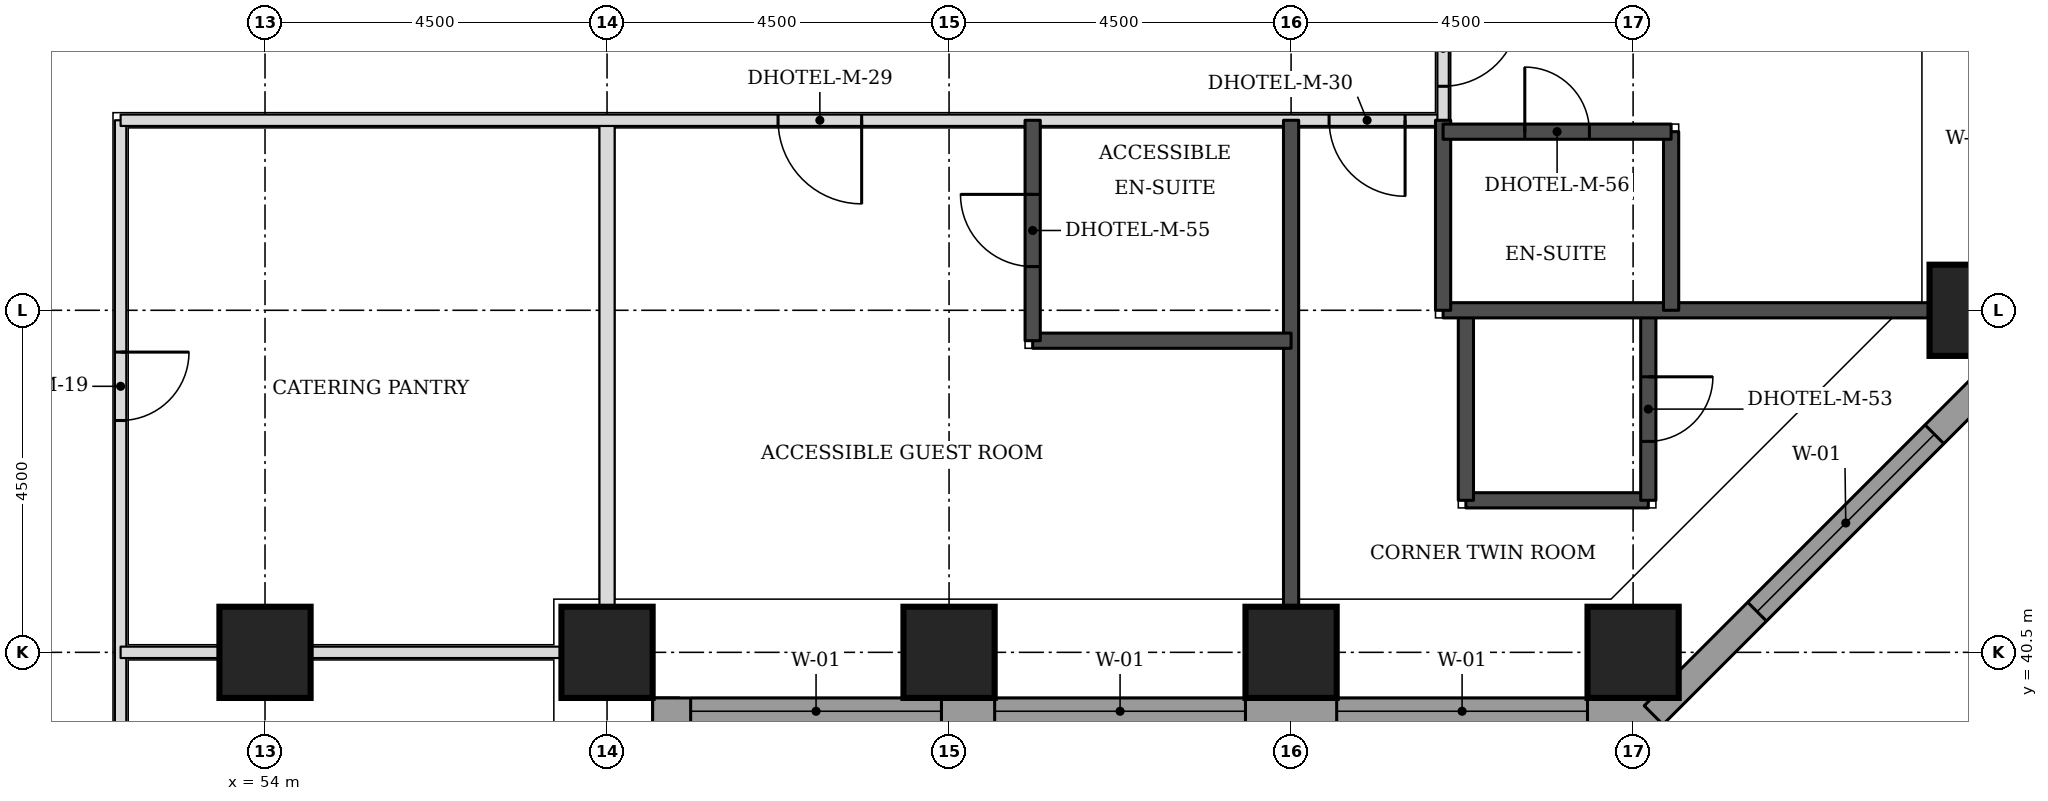
"""IFC4 building model, lengths in metres.
Left out: names, types, materials, properties, quantities, classifications, styles, units other than length and angle.
Written with IfcOpenShell. Run it as: python <this file> out.ifc"""

import sys

from ifc_helpers import new_model, si_unit, direction, frame, frame_2d, origin, origin_2d, place, context, subcontext, project, spatial, rectangle, extrude, element, fill, save


model = new_model("IFC4")
c1 = context("Model", 3, precision=1e-05, world=origin(), true_north=direction((0.0, 1.0)))
c2 = subcontext(c1, "Body", "Model", "MODEL_VIEW")
j1 = project(units=[si_unit("LENGTHUNIT", "METRE"), si_unit("PLANEANGLEUNIT", "RADIAN")], contexts=[c1])
p1 = place(None, origin())
s1 = spatial("IfcSite", under=j1, at=p1, CompositionType="ELEMENT")
p2 = place(p1, origin())
s2 = spatial("IfcBuilding", under=s1, at=p2, CompositionType="ELEMENT")
p3 = place(p2, frame((0.0, 0.0, 23.1)))
s3 = spatial("IfcBuildingStorey", under=s2, at=p3, CompositionType="ELEMENT", Elevation=23.1)
for number, where, z_axis, x_axis in (
    (1, (54.0, 40.5, 0.0), (0.0, 0.0, 1.0), (1.0, 0.0, 0.0)),
    (2, (58.5, 40.5, 0.0), (0.0, 0.0, 1.0), (1.0, 0.0, 0.0)),
    (3, (63.0, 40.5, 0.0), (0.0, 0.0, 1.0), (1.0, 0.0, 0.0)),
    (4, (67.5, 40.5, 0.0), (0.0, 0.0, 1.0), (1.0, 0.0, 0.0)),
    (5, (72.0, 40.5, 0.0), (0.0, 0.0, 1.0), (1.0, 0.0, 0.0)),
    (6, (76.5, 45.0, 0.0), (0.0, 0.0, 1.0), (1.0, 0.0, 0.0)),
):
    element("IfcColumn", number, at=place(p3, frame(where, z_axis=z_axis, x_axis=x_axis)), inside=s3, PredefinedType="COLUMN", context=c2, shape_type="SweptSolid", body=[
        extrude(rectangle(XDim=1.2, YDim=1.2, at=origin_2d()), origin(), (0.0, 0.0, 1.0), 3.3),
    ])
p4 = place(p3, frame((59.275, 22.106, 0.0), z_axis=(0.0, 0.0, 1.0), x_axis=(0.0, 1.0, 0.0)))
e7 = element("IfcWall", 7, at=p4, inside=s3, PredefinedType="STANDARD", context=c2, shape_type="SweptSolid", body=[
    extrude(rectangle(XDim=17.793, YDim=0.35, at=frame_2d((8.897, 0.0))), origin(), (0.0, 0.0, 1.0), 3.055),
])
p5 = place(p4, frame((0.993, 0.0, 0.8)))
e8 = element("IfcOpeningElement", 8, at=p5, cuts=e7, PredefinedType="OPENING", context=c2, shape_type="SweptSolid", body=[
    extrude(rectangle(XDim=3.3, YDim=1.5, at=frame_2d((1.65, 0.75))), frame((0.0, 0.185, 0.0), z_axis=(0.0, -1.0, 0.0), x_axis=(1.0, 0.0, 0.0)), (0.0, 0.0, 1.0), 0.37),
])
p6 = place(p4, frame((5.493, 0.0, 0.8)))
e9 = element("IfcOpeningElement", 9, at=p6, cuts=e7, PredefinedType="OPENING", context=c2, shape_type="SweptSolid", body=[
    extrude(rectangle(XDim=3.3, YDim=1.5, at=frame_2d((1.65, 0.75))), frame((0.0, 0.185, 0.0), z_axis=(0.0, -1.0, 0.0), x_axis=(1.0, 0.0, 0.0)), (0.0, 0.0, 1.0), 0.37),
])
p7 = place(p4, frame((9.993, 0.0, 0.8)))
e10 = element("IfcOpeningElement", 10, at=p7, cuts=e7, PredefinedType="OPENING", context=c2, shape_type="SweptSolid", body=[
    extrude(rectangle(XDim=3.3, YDim=1.5, at=frame_2d((1.65, 0.75))), frame((0.0, 0.185, 0.0), z_axis=(0.0, -1.0, 0.0), x_axis=(1.0, 0.0, 0.0)), (0.0, 0.0, 1.0), 0.37),
])
p8 = place(p4, frame((13.993, 0.0, 0.8)))
e11 = element("IfcOpeningElement", 11, at=p8, cuts=e7, PredefinedType="OPENING", context=c2, shape_type="SweptSolid", body=[
    extrude(rectangle(XDim=3.3, YDim=1.5, at=frame_2d((1.65, 0.75))), frame((0.0, 0.185, 0.0), z_axis=(0.0, -1.0, 0.0), x_axis=(1.0, 0.0, 0.0)), (0.0, 0.0, 1.0), 0.37),
])
p9 = place(p3, frame((59.1, 39.725, 0.0), z_axis=(0.0, 0.0, 1.0), x_axis=(1.0, 0.0, 0.0)))
e12 = element("IfcWall", 12, at=p9, inside=s3, PredefinedType="STANDARD", context=c2, shape_type="SweptSolid", body=[
    extrude(rectangle(XDim=13.293, YDim=0.35, at=frame_2d((6.647, 0.0))), origin(), (0.0, 0.0, 1.0), 3.055),
])
p10 = place(p9, frame((0.5, 0.0, 0.8)))
e13 = element("IfcOpeningElement", 13, at=p10, cuts=e12, PredefinedType="OPENING", context=c2, shape_type="SweptSolid", body=[
    extrude(rectangle(XDim=3.3, YDim=1.5, at=frame_2d((1.65, 0.75))), frame((0.0, 0.185, 0.0), z_axis=(0.0, -1.0, 0.0), x_axis=(1.0, 0.0, 0.0)), (0.0, 0.0, 1.0), 0.37),
])
p11 = place(p9, frame((4.5, 0.0, 0.8)))
e14 = element("IfcOpeningElement", 14, at=p11, cuts=e12, PredefinedType="OPENING", context=c2, shape_type="SweptSolid", body=[
    extrude(rectangle(XDim=3.3, YDim=1.5, at=frame_2d((1.65, 0.75))), frame((0.0, 0.185, 0.0), z_axis=(0.0, -1.0, 0.0), x_axis=(1.0, 0.0, 0.0)), (0.0, 0.0, 1.0), 0.37),
])
p12 = place(p9, frame((9.0, 0.0, 0.8)))
e15 = element("IfcOpeningElement", 15, at=p12, cuts=e12, PredefinedType="OPENING", context=c2, shape_type="SweptSolid", body=[
    extrude(rectangle(XDim=3.3, YDim=1.5, at=frame_2d((1.65, 0.75))), frame((0.0, 0.185, 0.0), z_axis=(0.0, -1.0, 0.0), x_axis=(1.0, 0.0, 0.0)), (0.0, 0.0, 1.0), 0.37),
])
p13 = place(p3, frame((72.27, 39.674, 0.0), z_axis=(0.0, 0.0, 1.0), x_axis=(0.707106781187, 0.707106781187, 0.0)))
e16 = element("IfcWall", 16, at=p13, inside=s3, PredefinedType="STANDARD", context=c2, shape_type="SweptSolid", body=[
    extrude(rectangle(XDim=7.151, YDim=0.35, at=frame_2d((3.576, 0.0))), origin(), (0.0, 0.0, 1.0), 3.055),
])
p14 = place(p13, frame((1.926, 0.0, 0.8)))
e17 = element("IfcOpeningElement", 17, at=p14, cuts=e16, PredefinedType="OPENING", context=c2, shape_type="SweptSolid", body=[
    extrude(rectangle(XDim=3.3, YDim=1.5, at=frame_2d((1.65, 0.75))), frame((0.0, 0.185, 0.0), z_axis=(0.0, -1.0, 0.0), x_axis=(1.0, 0.0, 0.0)), (0.0, 0.0, 1.0), 0.37),
])
p15 = place(p3, frame((58.5, 41.1, 0.0), z_axis=(0.0, 0.0, 1.0), x_axis=(0.0, 1.0, 0.0)))
e18 = element("IfcWall", 18, at=p15, inside=s3, PredefinedType="PARTITIONING", context=c2, shape_type="SweptSolid", body=[
    extrude(rectangle(XDim=6.4, YDim=0.2, at=frame_2d((3.2, 0.0))), origin(), (0.0, 0.0, 1.0), 3.08),
])
p16 = place(p3, frame((52.1, 24.4, 0.0), z_axis=(0.0, 0.0, 1.0), x_axis=(0.0, 1.0, 0.0)))
e19 = element("IfcWall", 19, at=p16, inside=s3, PredefinedType="PARTITIONING", context=c2, shape_type="SweptSolid", body=[
    extrude(rectangle(XDim=23.1, YDim=0.15, at=frame_2d((11.55, 0.0))), origin(), (0.0, 0.0, 1.0), 3.08),
])
p17 = place(p16, frame((0.447, 0.0, 0.0)))
e20 = element("IfcOpeningElement", 20, at=p17, cuts=e19, PredefinedType="OPENING", context=c2, shape_type="SweptSolid", body=[
    extrude(rectangle(XDim=0.9, YDim=2.1, at=frame_2d((0.45, 1.05))), frame((0.0, 0.085, 0.0), z_axis=(0.0, -1.0, 0.0), x_axis=(1.0, 0.0, 0.0)), (0.0, 0.0, 1.0), 0.17),
])
p18 = place(p16, frame((4.4, 0.0, 0.0)))
e21 = element("IfcOpeningElement", 21, at=p18, cuts=e19, PredefinedType="OPENING", context=c2, shape_type="SweptSolid", body=[
    extrude(rectangle(XDim=0.9, YDim=2.1, at=frame_2d((0.45, 1.05))), frame((0.0, 0.085, 0.0), z_axis=(0.0, -1.0, 0.0), x_axis=(1.0, 0.0, 0.0)), (0.0, 0.0, 1.0), 0.17),
])
p19 = place(p16, frame((8.9, 0.0, 0.0)))
e22 = element("IfcOpeningElement", 22, at=p19, cuts=e19, PredefinedType="OPENING", context=c2, shape_type="SweptSolid", body=[
    extrude(rectangle(XDim=0.9, YDim=2.1, at=frame_2d((0.45, 1.05))), frame((0.0, 0.085, 0.0), z_axis=(0.0, -1.0, 0.0), x_axis=(1.0, 0.0, 0.0)), (0.0, 0.0, 1.0), 0.17),
])
p20 = place(p16, frame((13.4, 0.0, 0.0)))
e23 = element("IfcOpeningElement", 23, at=p20, cuts=e19, PredefinedType="OPENING", context=c2, shape_type="SweptSolid", body=[
    extrude(rectangle(XDim=0.9, YDim=2.1, at=frame_2d((0.45, 1.05))), frame((0.0, 0.085, 0.0), z_axis=(0.0, -1.0, 0.0), x_axis=(1.0, 0.0, 0.0)), (0.0, 0.0, 1.0), 0.17),
])
p21 = place(p16, frame((19.15, 0.0, 0.0)))
e24 = element("IfcOpeningElement", 24, at=p21, cuts=e19, PredefinedType="OPENING", context=c2, shape_type="SweptSolid", body=[
    extrude(rectangle(XDim=0.9, YDim=2.1, at=frame_2d((0.45, 1.05))), frame((0.0, 0.085, 0.0), z_axis=(0.0, -1.0, 0.0), x_axis=(1.0, 0.0, 0.0)), (0.0, 0.0, 1.0), 0.17),
])
p22 = place(p3, frame((52.1, 47.5, 0.0), z_axis=(0.0, 0.0, 1.0), x_axis=(1.0, 0.0, 0.0)))
e25 = element("IfcWall", 25, at=p22, inside=s3, PredefinedType="PARTITIONING", context=c2, shape_type="SweptSolid", body=[
    extrude(rectangle(XDim=17.4, YDim=0.15, at=frame_2d((8.7, 0.0))), origin(), (0.0, 0.0, 1.0), 3.08),
])
p23 = place(p22, frame((8.65, 0.0, 0.0)))
e26 = element("IfcOpeningElement", 26, at=p23, cuts=e25, PredefinedType="OPENING", context=c2, shape_type="SweptSolid", body=[
    extrude(rectangle(XDim=1.1, YDim=2.1, at=frame_2d((0.55, 1.05))), frame((0.0, 0.085, 0.0), z_axis=(0.0, -1.0, 0.0), x_axis=(1.0, 0.0, 0.0)), (0.0, 0.0, 1.0), 0.17),
])
p24 = place(p22, frame((15.9, 0.0, 0.0)))
e27 = element("IfcOpeningElement", 27, at=p24, cuts=e25, PredefinedType="OPENING", context=c2, shape_type="SweptSolid", body=[
    extrude(rectangle(XDim=1.0, YDim=2.1, at=frame_2d((0.5, 1.05))), frame((0.0, 0.085, 0.0), z_axis=(0.0, -1.0, 0.0), x_axis=(1.0, 0.0, 0.0)), (0.0, 0.0, 1.0), 0.17),
])
p25 = place(p3, frame((69.5, 47.5, 0.0), z_axis=(0.0, 0.0, 1.0), x_axis=(0.0, 1.0, 0.0)))
e28 = element("IfcWall", 28, at=p25, inside=s3, PredefinedType="PARTITIONING", context=c2, shape_type="SweptSolid", body=[
    extrude(rectangle(XDim=26.5, YDim=0.15, at=frame_2d((13.25, 0.0))), origin(), (0.0, 0.0, 1.0), 3.08),
])
p26 = place(p25, frame((25.053, 0.0, 0.0)))
e29 = element("IfcOpeningElement", 29, at=p26, cuts=e28, PredefinedType="OPENING", context=c2, shape_type="SweptSolid", body=[
    extrude(rectangle(XDim=1.0, YDim=2.1, at=frame_2d((0.5, 1.05))), frame((0.0, 0.085, 0.0), z_axis=(0.0, -1.0, 0.0), x_axis=(1.0, 0.0, 0.0)), (0.0, 0.0, 1.0), 0.17),
])
p27 = place(p25, frame((22.925, 0.0, 0.0)))
e30 = element("IfcOpeningElement", 30, at=p27, cuts=e28, PredefinedType="OPENING", context=c2, shape_type="SweptSolid", body=[
    extrude(rectangle(XDim=1.0, YDim=2.1, at=frame_2d((0.5, 1.05))), frame((0.0, 0.085, 0.0), z_axis=(0.0, -1.0, 0.0), x_axis=(1.0, 0.0, 0.0)), (0.0, 0.0, 1.0), 0.17),
])
p28 = place(p25, frame((16.325, 0.0, 0.0)))
e31 = element("IfcOpeningElement", 31, at=p28, cuts=e28, PredefinedType="OPENING", context=c2, shape_type="SweptSolid", body=[
    extrude(rectangle(XDim=1.0, YDim=2.1, at=frame_2d((0.5, 1.05))), frame((0.0, 0.085, 0.0), z_axis=(0.0, -1.0, 0.0), x_axis=(1.0, 0.0, 0.0)), (0.0, 0.0, 1.0), 0.17),
])
p29 = place(p25, frame((13.925, 0.0, 0.0)))
e32 = element("IfcOpeningElement", 32, at=p29, cuts=e28, PredefinedType="OPENING", context=c2, shape_type="SweptSolid", body=[
    extrude(rectangle(XDim=1.0, YDim=2.1, at=frame_2d((0.5, 1.05))), frame((0.0, 0.085, 0.0), z_axis=(0.0, -1.0, 0.0), x_axis=(1.0, 0.0, 0.0)), (0.0, 0.0, 1.0), 0.17),
])
p30 = place(p25, frame((4.25, 0.0, 0.0)))
e33 = element("IfcOpeningElement", 33, at=p30, cuts=e28, PredefinedType="OPENING", context=c2, shape_type="SweptSolid", body=[
    extrude(rectangle(XDim=1.1, YDim=2.1, at=frame_2d((0.55, 1.05))), frame((0.0, 0.085, 0.0), z_axis=(0.0, -1.0, 0.0), x_axis=(1.0, 0.0, 0.0)), (0.0, 0.0, 1.0), 0.17),
])
p31 = place(p25, frame((0.447, 0.0, 0.0)))
e34 = element("IfcOpeningElement", 34, at=p31, cuts=e28, PredefinedType="OPENING", context=c2, shape_type="SweptSolid", body=[
    extrude(rectangle(XDim=1.0, YDim=2.1, at=frame_2d((0.5, 1.05))), frame((0.0, 0.085, 0.0), z_axis=(0.0, -1.0, 0.0), x_axis=(1.0, 0.0, 0.0)), (0.0, 0.0, 1.0), 0.17),
])
p32 = place(p3, frame((67.5, 41.1, 0.0), z_axis=(0.0, 0.0, 1.0), x_axis=(0.0, 1.0, 0.0)))
e35 = element("IfcWall", 35, at=p32, inside=s3, PredefinedType="SOLIDWALL", context=c2, shape_type="SweptSolid", body=[
    extrude(rectangle(XDim=6.4, YDim=0.2, at=frame_2d((3.2, 0.0))), origin(), (0.0, 0.0, 1.0), 3.08),
])
p33 = place(p3, frame((69.8, 42.5, 0.0), z_axis=(0.0, 0.0, 1.0), x_axis=(1.0, 0.0, 0.0)))
e36 = element("IfcWall", 36, at=p33, inside=s3, PredefinedType="SOLIDWALL", context=c2, shape_type="SweptSolid", body=[
    extrude(rectangle(XDim=2.4, YDim=0.2, at=frame_2d((1.2, 0.0))), origin(), (0.0, 0.0, 1.0), 3.08),
])
p34 = place(p3, frame((69.8, 42.5, 0.0), z_axis=(0.0, 0.0, 1.0), x_axis=(0.0, 1.0, 0.0)))
e37 = element("IfcWall", 37, at=p34, inside=s3, PredefinedType="SOLIDWALL", context=c2, shape_type="SweptSolid", body=[
    extrude(rectangle(XDim=2.5, YDim=0.2, at=frame_2d((1.25, 0.0))), origin(), (0.0, 0.0, 1.0), 3.08),
])
p35 = place(p3, frame((72.2, 42.5, 0.0), z_axis=(0.0, 0.0, 1.0), x_axis=(0.0, 1.0, 0.0)))
e38 = element("IfcWall", 38, at=p35, inside=s3, PredefinedType="SOLIDWALL", context=c2, shape_type="SweptSolid", body=[
    extrude(rectangle(XDim=2.5, YDim=0.2, at=frame_2d((1.25, 0.0))), origin(), (0.0, 0.0, 1.0), 3.08),
])
p36 = place(p35, frame((0.775, 0.0, 0.0)))
e39 = element("IfcOpeningElement", 39, at=p36, cuts=e38, PredefinedType="OPENING", context=c2, shape_type="SweptSolid", body=[
    extrude(rectangle(XDim=0.85, YDim=2.1, at=frame_2d((0.425, 1.05))), frame((0.0, 0.11, 0.0), z_axis=(0.0, -1.0, 0.0), x_axis=(1.0, 0.0, 0.0)), (0.0, 0.0, 1.0), 0.22),
])
p37 = place(p3, frame((64.1, 44.6, 0.0), z_axis=(0.0, 0.0, 1.0), x_axis=(1.0, 0.0, 0.0)))
e40 = element("IfcWall", 40, at=p37, inside=s3, PredefinedType="SOLIDWALL", context=c2, shape_type="SweptSolid", body=[
    extrude(rectangle(XDim=3.4, YDim=0.2, at=frame_2d((1.7, 0.0))), origin(), (0.0, 0.0, 1.0), 3.08),
])
p38 = place(p3, frame((64.1, 44.6, 0.0), z_axis=(0.0, 0.0, 1.0), x_axis=(0.0, 1.0, 0.0)))
e41 = element("IfcWall", 41, at=p38, inside=s3, PredefinedType="SOLIDWALL", context=c2, shape_type="SweptSolid", body=[
    extrude(rectangle(XDim=2.9, YDim=0.2, at=frame_2d((1.45, 0.0))), origin(), (0.0, 0.0, 1.0), 3.08),
])
p39 = place(p38, frame((0.975, 0.0, 0.0)))
e42 = element("IfcOpeningElement", 42, at=p39, cuts=e41, PredefinedType="OPENING", context=c2, shape_type="SweptSolid", body=[
    extrude(rectangle(XDim=0.95, YDim=2.1, at=frame_2d((0.475, 1.05))), frame((0.0, 0.11, 0.0), z_axis=(0.0, -1.0, 0.0), x_axis=(1.0, 0.0, 0.0)), (0.0, 0.0, 1.0), 0.22),
])
p40 = place(p3, frame((69.5, 45.0, 0.0), z_axis=(0.0, 0.0, 1.0), x_axis=(1.0, 0.0, 0.0)))
e43 = element("IfcWall", 43, at=p40, inside=s3, PredefinedType="SOLIDWALL", context=c2, shape_type="SweptSolid", body=[
    extrude(rectangle(XDim=6.4, YDim=0.2, at=frame_2d((3.2, 0.0))), origin(), (0.0, 0.0, 1.0), 3.08),
])
p41 = place(p3, frame((69.5, 45.0, 0.0), z_axis=(0.0, 0.0, 1.0), x_axis=(0.0, 1.0, 0.0)))
e44 = element("IfcWall", 44, at=p41, inside=s3, PredefinedType="SOLIDWALL", context=c2, shape_type="SweptSolid", body=[
    extrude(rectangle(XDim=2.5, YDim=0.2, at=frame_2d((1.25, 0.0))), origin(), (0.0, 0.0, 1.0), 3.08),
])
p42 = place(p3, frame((72.5, 45.0, 0.0), z_axis=(0.0, 0.0, 1.0), x_axis=(0.0, 1.0, 0.0)))
e45 = element("IfcWall", 45, at=p42, inside=s3, PredefinedType="SOLIDWALL", context=c2, shape_type="SweptSolid", body=[
    extrude(rectangle(XDim=2.35, YDim=0.2, at=frame_2d((1.175, 0.0))), origin(), (0.0, 0.0, 1.0), 3.08),
])
p43 = place(p3, frame((69.5, 47.35, 0.0), z_axis=(0.0, 0.0, 1.0), x_axis=(1.0, 0.0, 0.0)))
e46 = element("IfcWall", 46, at=p43, inside=s3, PredefinedType="SOLIDWALL", context=c2, shape_type="SweptSolid", body=[
    extrude(rectangle(XDim=3.0, YDim=0.2, at=frame_2d((1.5, 0.0))), origin(), (0.0, 0.0, 1.0), 3.08),
])
p44 = place(p43, frame((1.075, 0.0, 0.0)))
e47 = element("IfcOpeningElement", 47, at=p44, cuts=e46, PredefinedType="OPENING", context=c2, shape_type="SweptSolid", body=[
    extrude(rectangle(XDim=0.85, YDim=2.1, at=frame_2d((0.425, 1.05))), frame((0.0, 0.11, 0.0), z_axis=(0.0, -1.0, 0.0), x_axis=(1.0, 0.0, 0.0)), (0.0, 0.0, 1.0), 0.22),
])
p45 = place(p3, frame((52.1, 40.5, 0.0), z_axis=(0.0, 0.0, 1.0), x_axis=(1.0, 0.0, 0.0)))
e48 = element("IfcWall", 48, at=p45, inside=s3, PredefinedType="PARTITIONING", context=c2, shape_type="SweptSolid", body=[
    extrude(rectangle(XDim=5.8, YDim=0.15, at=frame_2d((2.9, 0.0))), origin(), (0.0, 0.0, 1.0), 2.33),
])
p46 = place(p10, origin())
e49 = element("IfcWindow", 49, at=p46, inside=s3, PartitioningType="SINGLE_PANEL", PredefinedType="WINDOW", context=c2, shape_type="SweptSolid", body=[
    extrude(rectangle(XDim=3.3, YDim=1.5, at=frame_2d((1.65, 0.75))), frame((0.0, 0.085, 0.0), z_axis=(0.0, -1.0, 0.0), x_axis=(1.0, 0.0, 0.0)), (0.0, 0.0, 1.0), 0.06),
])
fill(e13, e49)
p47 = place(p11, origin())
e50 = element("IfcWindow", 50, at=p47, inside=s3, PartitioningType="SINGLE_PANEL", PredefinedType="WINDOW", context=c2, shape_type="SweptSolid", body=[
    extrude(rectangle(XDim=3.3, YDim=1.5, at=frame_2d((1.65, 0.75))), frame((0.0, 0.085, 0.0), z_axis=(0.0, -1.0, 0.0), x_axis=(1.0, 0.0, 0.0)), (0.0, 0.0, 1.0), 0.06),
])
fill(e14, e50)
p48 = place(p12, origin())
e51 = element("IfcWindow", 51, at=p48, inside=s3, PartitioningType="SINGLE_PANEL", PredefinedType="WINDOW", context=c2, shape_type="SweptSolid", body=[
    extrude(rectangle(XDim=3.3, YDim=1.5, at=frame_2d((1.65, 0.75))), frame((0.0, 0.085, 0.0), z_axis=(0.0, -1.0, 0.0), x_axis=(1.0, 0.0, 0.0)), (0.0, 0.0, 1.0), 0.06),
])
fill(e15, e51)
p49 = place(p14, origin())
e52 = element("IfcWindow", 52, at=p49, inside=s3, PartitioningType="SINGLE_PANEL", PredefinedType="WINDOW", context=c2, shape_type="SweptSolid", body=[
    extrude(rectangle(XDim=3.3, YDim=1.5, at=frame_2d((1.65, 0.75))), frame((0.0, 0.085, 0.0), z_axis=(0.0, -1.0, 0.0), x_axis=(1.0, 0.0, 0.0)), (0.0, 0.0, 1.0), 0.06),
])
fill(e17, e52)
p50 = place(p31, frame((1.0, 0.0, 0.0), z_axis=(0.0, 0.0, 1.0), x_axis=(-1.0, 0.0, 0.0)))
e53 = element("IfcDoor", 53, at=p50, inside=s3, OperationType="SINGLE_SWING_LEFT", PredefinedType="DOOR", context=c2, shape_type="SweptSolid", body=[
    extrude(rectangle(XDim=1.0, YDim=2.1, at=frame_2d((0.5, 1.05))), frame((0.0, 0.025, 0.0), z_axis=(0.0, -1.0, 0.0), x_axis=(1.0, 0.0, 0.0)), (0.0, 0.0, 1.0), 0.05),
])
fill(e34, e53)
p51 = place(p44, origin())
e54 = element("IfcDoor", 54, at=p51, inside=s3, OperationType="SINGLE_SWING_LEFT", PredefinedType="DOOR", context=c2, shape_type="SweptSolid", body=[
    extrude(rectangle(XDim=0.85, YDim=2.1, at=frame_2d((0.425, 1.05))), frame((0.0, 0.025, 0.0), z_axis=(0.0, -1.0, 0.0), x_axis=(1.0, 0.0, 0.0)), (0.0, 0.0, 1.0), 0.05),
])
fill(e47, e54)
p52 = place(p23, frame((1.1, 0.0, 0.0), z_axis=(0.0, 0.0, 1.0), x_axis=(-1.0, 0.0, 0.0)))
e55 = element("IfcDoor", 55, at=p52, inside=s3, OperationType="SINGLE_SWING_LEFT", PredefinedType="DOOR", context=c2, shape_type="SweptSolid", body=[
    extrude(rectangle(XDim=1.1, YDim=2.1, at=frame_2d((0.55, 1.05))), frame((0.0, 0.025, 0.0), z_axis=(0.0, -1.0, 0.0), x_axis=(1.0, 0.0, 0.0)), (0.0, 0.0, 1.0), 0.05),
])
fill(e26, e55)
p53 = place(p39, origin())
e56 = element("IfcDoor", 56, at=p53, inside=s3, OperationType="SINGLE_SWING_RIGHT", PredefinedType="DOOR", context=c2, shape_type="SweptSolid", body=[
    extrude(rectangle(XDim=0.95, YDim=2.1, at=frame_2d((0.475, 1.05))), frame((0.0, 0.025, 0.0), z_axis=(0.0, -1.0, 0.0), x_axis=(1.0, 0.0, 0.0)), (0.0, 0.0, 1.0), 0.05),
])
fill(e42, e56)
p54 = place(p24, frame((1.0, 0.0, 0.0), z_axis=(0.0, 0.0, 1.0), x_axis=(-1.0, 0.0, 0.0)))
e57 = element("IfcDoor", 57, at=p54, inside=s3, OperationType="SINGLE_SWING_LEFT", PredefinedType="DOOR", context=c2, shape_type="SweptSolid", body=[
    extrude(rectangle(XDim=1.0, YDim=2.1, at=frame_2d((0.5, 1.05))), frame((0.0, 0.025, 0.0), z_axis=(0.0, -1.0, 0.0), x_axis=(1.0, 0.0, 0.0)), (0.0, 0.0, 1.0), 0.05),
])
fill(e27, e57)
p55 = place(p36, frame((0.85, 0.0, 0.0), z_axis=(0.0, 0.0, 1.0), x_axis=(-1.0, 0.0, 0.0)))
e58 = element("IfcDoor", 58, at=p55, inside=s3, OperationType="SINGLE_SWING_LEFT", PredefinedType="DOOR", context=c2, shape_type="SweptSolid", body=[
    extrude(rectangle(XDim=0.85, YDim=2.1, at=frame_2d((0.425, 1.05))), frame((0.0, 0.025, 0.0), z_axis=(0.0, -1.0, 0.0), x_axis=(1.0, 0.0, 0.0)), (0.0, 0.0, 1.0), 0.05),
])
fill(e39, e58)
p56 = place(p21, frame((0.9, 0.0, 0.0), z_axis=(0.0, 0.0, 1.0), x_axis=(-1.0, 0.0, 0.0)))
e59 = element("IfcDoor", 59, at=p56, inside=s3, OperationType="SINGLE_SWING_LEFT", PredefinedType="DOOR", context=c2, shape_type="SweptSolid", body=[
    extrude(rectangle(XDim=0.9, YDim=2.1, at=frame_2d((0.45, 1.05))), frame((0.0, 0.025, 0.0), z_axis=(0.0, -1.0, 0.0), x_axis=(1.0, 0.0, 0.0)), (0.0, 0.0, 1.0), 0.05),
])
fill(e24, e59)
save(model, sys.argv[1])
